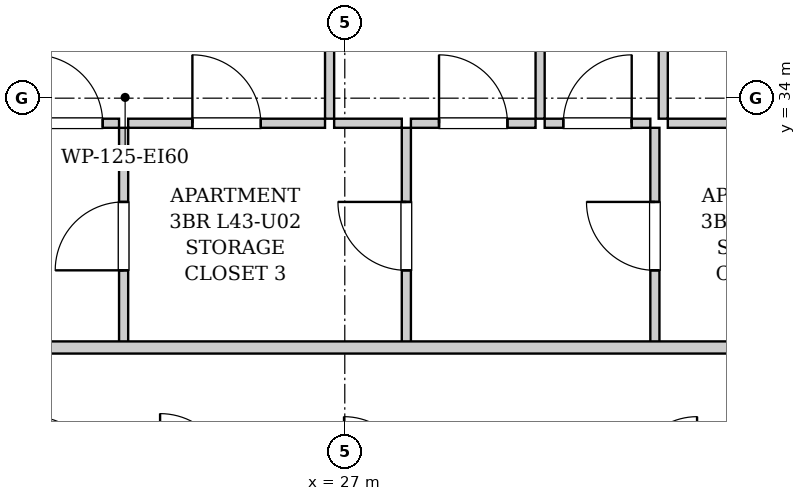
"""IFC4 building model, lengths in metres.
Left out: names, types, materials, properties, quantities, classifications, styles, units other than length and angle.
Written with IfcOpenShell. Run it as: python <this file> out.ifc"""

import sys

from ifc_helpers import new_model, si_unit, direction, frame, frame_2d, origin, place, context, subcontext, project, spatial, rectangle, extrude, element, fill, save


model = new_model("IFC4")
c1 = context("Model", 3, precision=1e-05, world=origin(), true_north=direction((0.0, 1.0)))
c2 = subcontext(c1, "Body", "Model", "MODEL_VIEW")
j1 = project(units=[si_unit("LENGTHUNIT", "METRE"), si_unit("PLANEANGLEUNIT", "RADIAN")], contexts=[c1])
p1 = place(None, origin())
s1 = spatial("IfcSite", under=j1, at=p1, CompositionType="ELEMENT")
p2 = place(p1, origin())
s2 = spatial("IfcBuilding", under=s1, at=p2, CompositionType="ELEMENT")
p3 = place(p2, frame((0.0, 0.0, 150.4)))
s3 = spatial("IfcBuildingStorey", under=s2, at=p3, CompositionType="ELEMENT", Elevation=150.4)
p4 = place(p3, frame((24.09, 30.76, 0.0), z_axis=(0.0, 0.0, 1.0), x_axis=(0.0, 1.0, 0.0)))
e1 = element("IfcWall", 1, at=p4, inside=s3, PredefinedType="PARTITIONING", context=c2, shape_type="SweptSolid", body=[
    extrude(rectangle(XDim=2.85, YDim=0.12, at=frame_2d((1.425, 0.0))), origin(), (0.0, 0.0, 1.0), 2.99),
])
p5 = place(p4, frame((0.975, 0.0, 0.0)))
e2 = element("IfcOpeningElement", 2, at=p5, cuts=e1, PredefinedType="OPENING", context=c2, shape_type="SweptSolid", body=[
    extrude(rectangle(XDim=0.9, YDim=2.05, at=frame_2d((0.45, 1.025))), frame((0.0, 0.07, 0.0), z_axis=(0.0, -1.0, 0.0), x_axis=(1.0, 0.0, 0.0)), (0.0, 0.0, 1.0), 0.14),
])
p6 = place(p3, frame((22.7, 33.67, 0.0), z_axis=(0.0, 0.0, 1.0), x_axis=(1.0, 0.0, 0.0)))
e3 = element("IfcWall", 3, at=p6, inside=s3, PredefinedType="PARTITIONING", context=c2, shape_type="SweptSolid", body=[
    extrude(rectangle(XDim=1.33, YDim=0.12, at=frame_2d((0.665, 0.0))), origin(), (0.0, 0.0, 1.0), 2.99),
])
p7 = place(p6, frame((0.215, 0.0, 0.0)))
e4 = element("IfcOpeningElement", 4, at=p7, cuts=e3, PredefinedType="OPENING", context=c2, shape_type="SweptSolid", body=[
    extrude(rectangle(XDim=0.9, YDim=2.05, at=frame_2d((0.45, 1.025))), frame((0.0, 0.07, 0.0), z_axis=(0.0, -1.0, 0.0), x_axis=(1.0, 0.0, 0.0)), (0.0, 0.0, 1.0), 0.14),
])
p8 = place(p3, frame((27.81, 30.76, 0.0), z_axis=(0.0, 0.0, 1.0), x_axis=(0.0, 1.0, 0.0)))
e5 = element("IfcWall", 5, at=p8, inside=s3, PredefinedType="PARTITIONING", context=c2, shape_type="SweptSolid", body=[
    extrude(rectangle(XDim=2.85, YDim=0.12, at=frame_2d((1.425, 0.0))), origin(), (0.0, 0.0, 1.0), 2.99),
])
p9 = place(p8, frame((0.975, 0.0, 0.0)))
e6 = element("IfcOpeningElement", 6, at=p9, cuts=e5, PredefinedType="OPENING", context=c2, shape_type="SweptSolid", body=[
    extrude(rectangle(XDim=0.9, YDim=2.05, at=frame_2d((0.45, 1.025))), frame((0.0, 0.07, 0.0), z_axis=(0.0, -1.0, 0.0), x_axis=(1.0, 0.0, 0.0)), (0.0, 0.0, 1.0), 0.14),
])
p10 = place(p3, frame((24.15, 33.67, 0.0), z_axis=(0.0, 0.0, 1.0), x_axis=(1.0, 0.0, 0.0)))
e7 = element("IfcWall", 7, at=p10, inside=s3, PredefinedType="PARTITIONING", context=c2, shape_type="SweptSolid", body=[
    extrude(rectangle(XDim=2.59, YDim=0.12, at=frame_2d((1.295, 0.0))), origin(), (0.0, 0.0, 1.0), 2.99),
])
p11 = place(p10, frame((0.845, 0.0, 0.0)))
e8 = element("IfcOpeningElement", 8, at=p11, cuts=e7, PredefinedType="OPENING", context=c2, shape_type="SweptSolid", body=[
    extrude(rectangle(XDim=0.9, YDim=2.05, at=frame_2d((0.45, 1.025))), frame((0.0, 0.07, 0.0), z_axis=(0.0, -1.0, 0.0), x_axis=(1.0, 0.0, 0.0)), (0.0, 0.0, 1.0), 0.14),
])
p12 = place(p3, frame((26.86, 33.67, 0.0), z_axis=(0.0, 0.0, 1.0), x_axis=(1.0, 0.0, 0.0)))
e9 = element("IfcWall", 9, at=p12, inside=s3, PredefinedType="PARTITIONING", context=c2, shape_type="SweptSolid", body=[
    extrude(rectangle(XDim=0.89, YDim=0.12, at=frame_2d((0.445, 0.0))), origin(), (0.0, 0.0, 1.0), 2.99),
])
p13 = place(p3, frame((31.08, 30.76, 0.0), z_axis=(0.0, 0.0, 1.0), x_axis=(0.0, 1.0, 0.0)))
e10 = element("IfcWall", 10, at=p13, inside=s3, PredefinedType="PARTITIONING", context=c2, shape_type="SweptSolid", body=[
    extrude(rectangle(XDim=2.85, YDim=0.12, at=frame_2d((1.425, 0.0))), origin(), (0.0, 0.0, 1.0), 2.99),
])
p14 = place(p13, frame((0.975, 0.0, 0.0)))
e11 = element("IfcOpeningElement", 11, at=p14, cuts=e10, PredefinedType="OPENING", context=c2, shape_type="SweptSolid", body=[
    extrude(rectangle(XDim=0.9, YDim=2.05, at=frame_2d((0.45, 1.025))), frame((0.0, 0.07, 0.0), z_axis=(0.0, -1.0, 0.0), x_axis=(1.0, 0.0, 0.0)), (0.0, 0.0, 1.0), 0.14),
])
p15 = place(p3, frame((27.87, 33.67, 0.0), z_axis=(0.0, 0.0, 1.0), x_axis=(1.0, 0.0, 0.0)))
e12 = element("IfcWall", 12, at=p15, inside=s3, PredefinedType="PARTITIONING", context=c2, shape_type="SweptSolid", body=[
    extrude(rectangle(XDim=1.64, YDim=0.12, at=frame_2d((0.82, 0.0))), origin(), (0.0, 0.0, 1.0), 2.99),
])
p16 = place(p15, frame((0.37, 0.0, 0.0)))
e13 = element("IfcOpeningElement", 13, at=p16, cuts=e12, PredefinedType="OPENING", context=c2, shape_type="SweptSolid", body=[
    extrude(rectangle(XDim=0.9, YDim=2.05, at=frame_2d((0.45, 1.025))), frame((0.0, 0.07, 0.0), z_axis=(0.0, -1.0, 0.0), x_axis=(1.0, 0.0, 0.0)), (0.0, 0.0, 1.0), 0.14),
])
p17 = place(p3, frame((29.63, 33.67, 0.0), z_axis=(0.0, 0.0, 1.0), x_axis=(1.0, 0.0, 0.0)))
e14 = element("IfcWall", 14, at=p17, inside=s3, PredefinedType="PARTITIONING", context=c2, shape_type="SweptSolid", body=[
    extrude(rectangle(XDim=1.39, YDim=0.12, at=frame_2d((0.695, 0.0))), origin(), (0.0, 0.0, 1.0), 2.99),
])
p18 = place(p17, frame((0.245, 0.0, 0.0)))
e15 = element("IfcOpeningElement", 15, at=p18, cuts=e14, PredefinedType="OPENING", context=c2, shape_type="SweptSolid", body=[
    extrude(rectangle(XDim=0.9, YDim=2.05, at=frame_2d((0.45, 1.025))), frame((0.0, 0.07, 0.0), z_axis=(0.0, -1.0, 0.0), x_axis=(1.0, 0.0, 0.0)), (0.0, 0.0, 1.0), 0.14),
])
p19 = place(p3, frame((31.25, 33.67, 0.0), z_axis=(0.0, 0.0, 1.0), x_axis=(1.0, 0.0, 0.0)))
e16 = element("IfcWall", 16, at=p19, inside=s3, PredefinedType="PARTITIONING", context=c2, shape_type="SweptSolid", body=[
    extrude(rectangle(XDim=3.44, YDim=0.12, at=frame_2d((1.72, 0.0))), origin(), (0.0, 0.0, 1.0), 2.99),
])
p20 = place(p19, frame((1.27, 0.0, 0.0)))
e17 = element("IfcOpeningElement", 17, at=p20, cuts=e16, PredefinedType="OPENING", context=c2, shape_type="SweptSolid", body=[
    extrude(rectangle(XDim=0.9, YDim=2.05, at=frame_2d((0.45, 1.025))), frame((0.0, 0.07, 0.0), z_axis=(0.0, -1.0, 0.0), x_axis=(1.0, 0.0, 0.0)), (0.0, 0.0, 1.0), 0.14),
])
p21 = place(p3, frame((26.8, 33.73, 0.0), z_axis=(0.0, 0.0, 1.0), x_axis=(0.0, 1.0, 0.0)))
e18 = element("IfcWall", 18, at=p21, inside=s3, PredefinedType="PARTITIONING", context=c2, shape_type="SweptSolid", body=[
    extrude(rectangle(XDim=9.29, YDim=0.12, at=frame_2d((4.645, 0.0))), origin(), (0.0, 0.0, 1.0), 2.99),
])
p22 = place(p21, frame((4.18, 0.0, 0.0)))
e19 = element("IfcOpeningElement", 19, at=p22, cuts=e18, PredefinedType="OPENING", context=c2, shape_type="SweptSolid", body=[
    extrude(rectangle(XDim=0.9, YDim=2.05, at=frame_2d((0.45, 1.025))), frame((0.0, 0.07, 0.0), z_axis=(0.0, -1.0, 0.0), x_axis=(1.0, 0.0, 0.0)), (0.0, 0.0, 1.0), 0.14),
])
p23 = place(p3, frame((29.57, 33.73, 0.0), z_axis=(0.0, 0.0, 1.0), x_axis=(0.0, 1.0, 0.0)))
e20 = element("IfcWall", 20, at=p23, inside=s3, PredefinedType="PARTITIONING", context=c2, shape_type="SweptSolid", body=[
    extrude(rectangle(XDim=9.29, YDim=0.12, at=frame_2d((4.645, 0.0))), origin(), (0.0, 0.0, 1.0), 2.99),
])
p24 = place(p23, frame((4.18, 0.0, 0.0)))
e21 = element("IfcOpeningElement", 21, at=p24, cuts=e20, PredefinedType="OPENING", context=c2, shape_type="SweptSolid", body=[
    extrude(rectangle(XDim=0.9, YDim=2.05, at=frame_2d((0.45, 1.025))), frame((0.0, 0.07, 0.0), z_axis=(0.0, -1.0, 0.0), x_axis=(1.0, 0.0, 0.0)), (0.0, 0.0, 1.0), 0.14),
])
p25 = place(p3, frame((31.19, 33.73, 0.0), z_axis=(0.0, 0.0, 1.0), x_axis=(0.0, 1.0, 0.0)))
e22 = element("IfcWall", 22, at=p25, inside=s3, PredefinedType="PARTITIONING", context=c2, shape_type="SweptSolid", body=[
    extrude(rectangle(XDim=7.14, YDim=0.12, at=frame_2d((3.57, 0.0))), origin(), (0.0, 0.0, 1.0), 2.99),
])
p26 = place(p25, frame((3.12, 0.0, 0.0)))
e23 = element("IfcOpeningElement", 23, at=p26, cuts=e22, PredefinedType="OPENING", context=c2, shape_type="SweptSolid", body=[
    extrude(rectangle(XDim=0.9, YDim=2.05, at=frame_2d((0.45, 1.025))), frame((0.0, 0.07, 0.0), z_axis=(0.0, -1.0, 0.0), x_axis=(1.0, 0.0, 0.0)), (0.0, 0.0, 1.0), 0.14),
])
p27 = place(p3, frame((10.05, 30.72, 0.0), z_axis=(0.0, 0.0, 1.0), x_axis=(1.0, 0.0, 0.0)))
e24 = element("IfcWall", 24, at=p27, inside=s3, PredefinedType="PARTITIONING", context=c2, shape_type="SweptSolid", body=[
    extrude(rectangle(XDim=27.7, YDim=0.16, at=frame_2d((13.85, 0.0))), origin(), (0.0, 0.0, 1.0), 2.99),
])
p28 = place(p27, frame((4.295, 0.0, 0.0)))
e25 = element("IfcOpeningElement", 25, at=p28, cuts=e24, PredefinedType="OPENING", context=c2, shape_type="SweptSolid", body=[
    extrude(rectangle(XDim=0.95, YDim=2.1, at=frame_2d((0.475, 1.05))), frame((0.0, 0.09, 0.0), z_axis=(0.0, -1.0, 0.0), x_axis=(1.0, 0.0, 0.0)), (0.0, 0.0, 1.0), 0.18),
])
p29 = place(p5, origin())
e26 = element("IfcDoor", 26, at=p29, inside=s3, OperationType="SINGLE_SWING_LEFT", PredefinedType="DOOR", context=c2, shape_type="SweptSolid", body=[
    extrude(rectangle(XDim=0.9, YDim=2.05, at=frame_2d((0.45, 1.025))), frame((0.0, 0.025, 0.0), z_axis=(0.0, -1.0, 0.0), x_axis=(1.0, 0.0, 0.0)), (0.0, 0.0, 1.0), 0.05),
])
fill(e2, e26)
p30 = place(p7, origin())
e27 = element("IfcDoor", 27, at=p30, inside=s3, OperationType="SINGLE_SWING_LEFT", PredefinedType="DOOR", context=c2, shape_type="SweptSolid", body=[
    extrude(rectangle(XDim=0.9, YDim=2.05, at=frame_2d((0.45, 1.025))), frame((0.0, 0.025, 0.0), z_axis=(0.0, -1.0, 0.0), x_axis=(1.0, 0.0, 0.0)), (0.0, 0.0, 1.0), 0.05),
])
fill(e4, e27)
p31 = place(p9, origin())
e28 = element("IfcDoor", 28, at=p31, inside=s3, OperationType="SINGLE_SWING_RIGHT", PredefinedType="DOOR", context=c2, shape_type="SweptSolid", body=[
    extrude(rectangle(XDim=0.9, YDim=2.05, at=frame_2d((0.45, 1.025))), frame((0.0, 0.025, 0.0), z_axis=(0.0, -1.0, 0.0), x_axis=(1.0, 0.0, 0.0)), (0.0, 0.0, 1.0), 0.05),
])
fill(e6, e28)
p32 = place(p11, origin())
e29 = element("IfcDoor", 29, at=p32, inside=s3, OperationType="SINGLE_SWING_LEFT", PredefinedType="DOOR", context=c2, shape_type="SweptSolid", body=[
    extrude(rectangle(XDim=0.9, YDim=2.05, at=frame_2d((0.45, 1.025))), frame((0.0, 0.025, 0.0), z_axis=(0.0, -1.0, 0.0), x_axis=(1.0, 0.0, 0.0)), (0.0, 0.0, 1.0), 0.05),
])
fill(e8, e29)
p33 = place(p14, origin())
e30 = element("IfcDoor", 30, at=p33, inside=s3, OperationType="SINGLE_SWING_RIGHT", PredefinedType="DOOR", context=c2, shape_type="SweptSolid", body=[
    extrude(rectangle(XDim=0.9, YDim=2.05, at=frame_2d((0.45, 1.025))), frame((0.0, 0.025, 0.0), z_axis=(0.0, -1.0, 0.0), x_axis=(1.0, 0.0, 0.0)), (0.0, 0.0, 1.0), 0.05),
])
fill(e11, e30)
p34 = place(p16, origin())
e31 = element("IfcDoor", 31, at=p34, inside=s3, OperationType="SINGLE_SWING_LEFT", PredefinedType="DOOR", context=c2, shape_type="SweptSolid", body=[
    extrude(rectangle(XDim=0.9, YDim=2.05, at=frame_2d((0.45, 1.025))), frame((0.0, 0.025, 0.0), z_axis=(0.0, -1.0, 0.0), x_axis=(1.0, 0.0, 0.0)), (0.0, 0.0, 1.0), 0.05),
])
fill(e13, e31)
p35 = place(p18, origin())
e32 = element("IfcDoor", 32, at=p35, inside=s3, OperationType="SINGLE_SWING_RIGHT", PredefinedType="DOOR", context=c2, shape_type="SweptSolid", body=[
    extrude(rectangle(XDim=0.9, YDim=2.05, at=frame_2d((0.45, 1.025))), frame((0.0, 0.025, 0.0), z_axis=(0.0, -1.0, 0.0), x_axis=(1.0, 0.0, 0.0)), (0.0, 0.0, 1.0), 0.05),
])
fill(e15, e32)
save(model, sys.argv[1])
